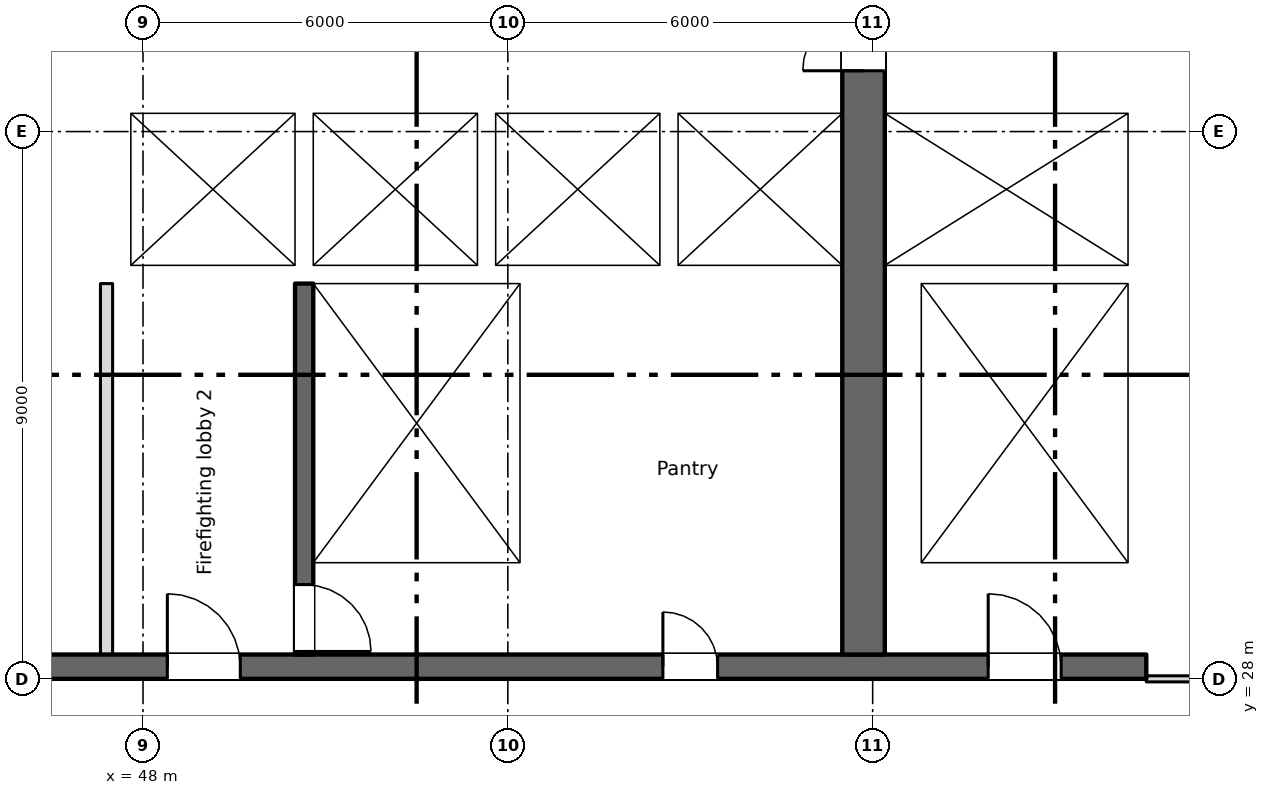
"""IFC4 building model, lengths in metres.
Left out: names, types, materials, properties, quantities, classifications, styles, units other than length and angle.
Written with IfcOpenShell. Run it as: python <this file> out.ifc"""

import sys

from ifc_helpers import new_model, si_unit, direction, frame, frame_2d, origin, place, context, subcontext, project, spatial, rectangle, extrude, element, fill, save


model = new_model("IFC4")
c1 = context("Model", 3, precision=1e-05, world=origin(), true_north=direction((0.0, 1.0)))
c2 = subcontext(c1, "Body", "Model", "MODEL_VIEW")
j1 = project(units=[si_unit("LENGTHUNIT", "METRE"), si_unit("PLANEANGLEUNIT", "RADIAN")], contexts=[c1])
p1 = place(None, origin())
s1 = spatial("IfcSite", under=j1, at=p1, CompositionType="ELEMENT")
p2 = place(p1, origin())
s2 = spatial("IfcBuilding", under=s1, at=p2, CompositionType="ELEMENT")
p3 = place(p2, frame((0.0, 0.0, 211.75)))
s3 = spatial("IfcBuildingStorey", under=s2, at=p3, CompositionType="ELEMENT", Elevation=211.75)
p4 = place(p3, frame((6.6, 28.2, 0.0), z_axis=(0.0, 0.0, 1.0), x_axis=(1.0, 0.0, 0.0)))
e1 = element("IfcWall", 1, at=p4, inside=s3, PredefinedType="SHEAR", context=c2, shape_type="SweptSolid", body=[
    extrude(rectangle(XDim=57.9, YDim=0.4, at=frame_2d((28.95, 0.0))), origin(), (0.0, 0.0, 1.0), 3.35),
])
p5 = place(p4, frame((12.663, 0.0, 0.0)))
e2 = element("IfcOpeningElement", 2, at=p5, cuts=e1, PredefinedType="OPENING", context=c2, shape_type="SweptSolid", body=[
    extrude(rectangle(XDim=0.9, YDim=2.1, at=frame_2d((0.45, 1.05))), frame((0.0, 0.21, 0.0), z_axis=(0.0, -1.0, 0.0), x_axis=(1.0, 0.0, 0.0)), (0.0, 0.0, 1.0), 0.42),
])
p6 = place(p4, frame((15.238, 0.0, 0.0)))
e3 = element("IfcOpeningElement", 3, at=p6, cuts=e1, PredefinedType="OPENING", context=c2, shape_type="SweptSolid", body=[
    extrude(rectangle(XDim=0.9, YDim=2.1, at=frame_2d((0.45, 1.05))), frame((0.0, 0.21, 0.0), z_axis=(0.0, -1.0, 0.0), x_axis=(1.0, 0.0, 0.0)), (0.0, 0.0, 1.0), 0.42),
])
p7 = place(p4, frame((49.95, 0.0, 0.0)))
e4 = element("IfcOpeningElement", 4, at=p7, cuts=e1, PredefinedType="OPENING", context=c2, shape_type="SweptSolid", body=[
    extrude(rectangle(XDim=0.9, YDim=2.1, at=frame_2d((0.45, 1.05))), frame((0.0, 0.21, 0.0), z_axis=(0.0, -1.0, 0.0), x_axis=(1.0, 0.0, 0.0)), (0.0, 0.0, 1.0), 0.42),
])
p8 = place(p4, frame((0.663, 0.0, 0.0)))
e5 = element("IfcOpeningElement", 5, at=p8, cuts=e1, PredefinedType="OPENING", context=c2, shape_type="SweptSolid", body=[
    extrude(rectangle(XDim=0.9, YDim=2.1, at=frame_2d((0.45, 1.05))), frame((0.0, 0.21, 0.0), z_axis=(0.0, -1.0, 0.0), x_axis=(1.0, 0.0, 0.0)), (0.0, 0.0, 1.0), 0.42),
])
p9 = place(p4, frame((2.238, 0.0, 0.0)))
e6 = element("IfcOpeningElement", 6, at=p9, cuts=e1, PredefinedType="OPENING", context=c2, shape_type="SweptSolid", body=[
    extrude(rectangle(XDim=0.9, YDim=2.1, at=frame_2d((0.45, 1.05))), frame((0.0, 0.21, 0.0), z_axis=(0.0, -1.0, 0.0), x_axis=(1.0, 0.0, 0.0)), (0.0, 0.0, 1.0), 0.42),
])
p10 = place(p4, frame((4.8, 0.0, 0.0)))
e7 = element("IfcOpeningElement", 7, at=p10, cuts=e1, PredefinedType="OPENING", context=c2, shape_type="SweptSolid", body=[
    extrude(rectangle(XDim=1.2, YDim=2.1, at=frame_2d((0.6, 1.05))), frame((0.0, 0.21, 0.0), z_axis=(0.0, -1.0, 0.0), x_axis=(1.0, 0.0, 0.0)), (0.0, 0.0, 1.0), 0.42),
])
p11 = place(p4, frame((31.8, 0.0, 0.0)))
e8 = element("IfcOpeningElement", 8, at=p11, cuts=e1, PredefinedType="OPENING", context=c2, shape_type="SweptSolid", body=[
    extrude(rectangle(XDim=1.2, YDim=2.1, at=frame_2d((0.6, 1.05))), frame((0.0, 0.21, 0.0), z_axis=(0.0, -1.0, 0.0), x_axis=(1.0, 0.0, 0.0)), (0.0, 0.0, 1.0), 0.42),
])
p12 = place(p4, frame((55.3, 0.0, 0.0)))
e9 = element("IfcOpeningElement", 9, at=p12, cuts=e1, PredefinedType="OPENING", context=c2, shape_type="SweptSolid", body=[
    extrude(rectangle(XDim=1.2, YDim=2.1, at=frame_2d((0.6, 1.05))), frame((0.0, 0.21, 0.0), z_axis=(0.0, -1.0, 0.0), x_axis=(1.0, 0.0, 0.0)), (0.0, 0.0, 1.0), 0.42),
])
p13 = place(p4, frame((21.8, 0.0, 0.0)))
e10 = element("IfcOpeningElement", 10, at=p13, cuts=e1, PredefinedType="OPENING", context=c2, shape_type="SweptSolid", body=[
    extrude(rectangle(XDim=1.2, YDim=2.1, at=frame_2d((0.6, 1.05))), frame((0.0, 0.21, 0.0), z_axis=(0.0, -1.0, 0.0), x_axis=(1.0, 0.0, 0.0)), (0.0, 0.0, 1.0), 0.42),
])
p14 = place(p4, frame((41.8, 0.0, 0.0)))
e11 = element("IfcOpeningElement", 11, at=p14, cuts=e1, PredefinedType="OPENING", context=c2, shape_type="SweptSolid", body=[
    extrude(rectangle(XDim=1.2, YDim=2.1, at=frame_2d((0.6, 1.05))), frame((0.0, 0.21, 0.0), z_axis=(0.0, -1.0, 0.0), x_axis=(1.0, 0.0, 0.0)), (0.0, 0.0, 1.0), 0.42),
])
p15 = place(p4, frame((24.95, 0.0, 0.0)))
e12 = element("IfcOpeningElement", 12, at=p15, cuts=e1, PredefinedType="OPENING", context=c2, shape_type="SweptSolid", body=[
    extrude(rectangle(XDim=2.4, YDim=2.1, at=frame_2d((1.2, 1.05))), frame((0.0, 0.21, 0.0), z_axis=(0.0, -1.0, 0.0), x_axis=(1.0, 0.0, 0.0)), (0.0, 0.0, 1.0), 0.42),
])
p16 = place(p4, frame((37.45, 0.0, 0.0)))
e13 = element("IfcOpeningElement", 13, at=p16, cuts=e1, PredefinedType="OPENING", context=c2, shape_type="SweptSolid", body=[
    extrude(rectangle(XDim=2.4, YDim=2.1, at=frame_2d((1.2, 1.05))), frame((0.0, 0.21, 0.0), z_axis=(0.0, -1.0, 0.0), x_axis=(1.0, 0.0, 0.0)), (0.0, 0.0, 1.0), 0.42),
])
p17 = place(p4, frame((8.1, 0.0, 0.0)))
e14 = element("IfcOpeningElement", 14, at=p17, cuts=e1, PredefinedType="OPENING", context=c2, shape_type="SweptSolid", body=[
    extrude(rectangle(XDim=2.4, YDim=2.1, at=frame_2d((1.2, 1.05))), frame((0.0, 0.21, 0.0), z_axis=(0.0, -1.0, 0.0), x_axis=(1.0, 0.0, 0.0)), (0.0, 0.0, 1.0), 0.42),
])
p18 = place(p4, frame((28.95, 0.0, 0.0)))
e15 = element("IfcOpeningElement", 15, at=p18, cuts=e1, PredefinedType="OPENING", context=c2, shape_type="SweptSolid", body=[
    extrude(rectangle(XDim=0.9, YDim=2.1, at=frame_2d((0.45, 1.05))), frame((0.0, 0.21, 0.0), z_axis=(0.0, -1.0, 0.0), x_axis=(1.0, 0.0, 0.0)), (0.0, 0.0, 1.0), 0.42),
])
p19 = place(p4, frame((34.95, 0.0, 0.0)))
e16 = element("IfcOpeningElement", 16, at=p19, cuts=e1, PredefinedType="OPENING", context=c2, shape_type="SweptSolid", body=[
    extrude(rectangle(XDim=0.9, YDim=2.1, at=frame_2d((0.45, 1.05))), frame((0.0, 0.21, 0.0), z_axis=(0.0, -1.0, 0.0), x_axis=(1.0, 0.0, 0.0)), (0.0, 0.0, 1.0), 0.42),
])
p20 = place(p3, frame((64.35, 34.8, 0.0), z_axis=(0.0, 0.0, 1.0), x_axis=(0.0, 1.0, 0.0)))
e17 = element("IfcWall", 17, at=p20, inside=s3, PredefinedType="SHEAR", context=c2, shape_type="SweptSolid", body=[
    extrude(rectangle(XDim=10.5, YDim=0.3, at=frame_2d((5.25, 0.0))), origin(), (0.0, 0.0, 1.0), 3.35),
])
p21 = place(p3, frame((59.85, 28.4, 0.0), z_axis=(0.0, 0.0, 1.0), x_axis=(0.0, 1.0, 0.0)))
e18 = element("IfcWall", 18, at=p21, inside=s3, PredefinedType="SHEAR", context=c2, shape_type="SweptSolid", body=[
    extrude(rectangle(XDim=16.9, YDim=0.7, at=frame_2d((8.45, 0.0))), origin(), (0.0, 0.0, 1.0), 3.35),
])
p22 = place(p21, frame((9.6, 0.0, 0.0)))
e19 = element("IfcOpeningElement", 19, at=p22, cuts=e18, PredefinedType="OPENING", context=c2, shape_type="SweptSolid", body=[
    extrude(rectangle(XDim=2.0, YDim=2.1, at=frame_2d((1.0, 1.05))), frame((0.0, 0.36, 0.0), z_axis=(0.0, -1.0, 0.0), x_axis=(1.0, 0.0, 0.0)), (0.0, 0.0, 1.0), 0.72),
])
p23 = place(p21, frame((15.4, 0.0, 0.0)))
e20 = element("IfcOpeningElement", 20, at=p23, cuts=e18, PredefinedType="OPENING", context=c2, shape_type="SweptSolid", body=[
    extrude(rectangle(XDim=1.2, YDim=2.1, at=frame_2d((0.6, 1.05))), frame((0.0, 0.36, 0.0), z_axis=(0.0, -1.0, 0.0), x_axis=(1.0, 0.0, 0.0)), (0.0, 0.0, 1.0), 0.72),
])
p24 = place(p3, frame((50.65, 34.5, 0.0), z_axis=(0.0, 0.0, 1.0), x_axis=(0.0, -1.0, 0.0)))
e21 = element("IfcWall", 21, at=p24, inside=s3, PredefinedType="SHEAR", context=c2, shape_type="SweptSolid", body=[
    extrude(rectangle(XDim=6.1, YDim=0.3, at=frame_2d((3.05, 0.0))), origin(), (0.0, 0.0, 1.0), 3.35),
])
p25 = place(p24, frame((4.95, 0.0, 0.0)))
e22 = element("IfcOpeningElement", 22, at=p25, cuts=e21, PredefinedType="OPENING", context=c2, shape_type="SweptSolid", body=[
    extrude(rectangle(XDim=1.1, YDim=2.1, at=frame_2d((0.55, 1.05))), frame((0.0, 0.16, 0.0), z_axis=(0.0, -1.0, 0.0), x_axis=(1.0, 0.0, 0.0)), (0.0, 0.0, 1.0), 0.32),
])
p26 = place(p3, frame((54.35, 28.4, 0.0), z_axis=(0.0, 0.0, 1.0), x_axis=(0.0, 1.0, 0.0)))
e23 = element("IfcWall", 23, at=p26, inside=s3, PredefinedType="SHEAR", context=c2, shape_type="SweptSolid", body=[
    extrude(rectangle(XDim=6.1, YDim=0.3, at=frame_2d((3.05, 0.0))), origin(), (0.0, 0.0, 1.0), 3.35),
])
p27 = place(p3, frame((60.5, 28.4, 0.0), z_axis=(0.0, 0.0, 1.0), x_axis=(0.0, 1.0, 0.0)))
e24 = element("IfcWall", 24, at=p27, inside=s3, PredefinedType="SHEAR", context=c2, shape_type="SweptSolid", body=[
    extrude(rectangle(XDim=6.1, YDim=0.6, at=frame_2d((3.05, 0.0))), origin(), (0.0, 0.0, 1.0), 3.35),
])
p28 = place(p3, frame((64.35, 28.4, 0.0), z_axis=(0.0, 0.0, 1.0), x_axis=(0.0, 1.0, 0.0)))
e25 = element("IfcWall", 25, at=p28, inside=s3, PredefinedType="SHEAR", context=c2, shape_type="SweptSolid", body=[
    extrude(rectangle(XDim=6.1, YDim=0.3, at=frame_2d((3.05, 0.0))), origin(), (0.0, 0.0, 1.0), 3.35),
])
p29 = place(p3, frame((47.3, 34.65, 0.0), z_axis=(0.0, 0.0, 1.0), x_axis=(1.0, 0.0, 0.0)))
e26 = element("IfcWall", 26, at=p29, inside=s3, PredefinedType="SHEAR", context=c2, shape_type="SweptSolid", body=[
    extrude(rectangle(XDim=12.2, YDim=0.3, at=frame_2d((6.1, 0.0))), origin(), (0.0, 0.0, 1.0), 3.35),
])
p30 = place(p29, frame((1.3, 0.0, 0.0)))
e27 = element("IfcOpeningElement", 27, at=p30, cuts=e26, PredefinedType="OPENING", context=c2, shape_type="SweptSolid", body=[
    extrude(rectangle(XDim=1.1, YDim=2.1, at=frame_2d((0.55, 1.05))), frame((0.0, 0.16, 0.0), z_axis=(0.0, -1.0, 0.0), x_axis=(1.0, 0.0, 0.0)), (0.0, 0.0, 1.0), 0.32),
])
p31 = place(p3, frame((60.2, 34.65, 0.0), z_axis=(0.0, 0.0, 1.0), x_axis=(1.0, 0.0, 0.0)))
e28 = element("IfcWall", 28, at=p31, inside=s3, PredefinedType="SHEAR", context=c2, shape_type="SweptSolid", body=[
    extrude(rectangle(XDim=4.3, YDim=0.3, at=frame_2d((2.15, 0.0))), origin(), (0.0, 0.0, 1.0), 3.35),
])
p32 = place(p3, frame((47.3, 37.45, 0.0), z_axis=(0.0, 0.0, 1.0), x_axis=(1.0, 0.0, 0.0)))
e29 = element("IfcWall", 29, at=p32, inside=s3, PredefinedType="SHEAR", context=c2, shape_type="SweptSolid", body=[
    extrude(rectangle(XDim=12.2, YDim=0.3, at=frame_2d((6.1, 0.0))), origin(), (0.0, 0.0, 1.0), 3.35),
])
p33 = place(p32, frame((4.3, 0.0, 0.0)))
e30 = element("IfcOpeningElement", 30, at=p33, cuts=e29, PredefinedType="OPENING", context=c2, shape_type="SweptSolid", body=[
    extrude(rectangle(XDim=1.1, YDim=2.1, at=frame_2d((0.55, 1.05))), frame((0.0, 0.16, 0.0), z_axis=(0.0, -1.0, 0.0), x_axis=(1.0, 0.0, 0.0)), (0.0, 0.0, 1.0), 0.32),
])
p34 = place(p32, frame((7.3, 0.0, 0.0)))
e31 = element("IfcOpeningElement", 31, at=p34, cuts=e29, PredefinedType="OPENING", context=c2, shape_type="SweptSolid", body=[
    extrude(rectangle(XDim=1.1, YDim=2.1, at=frame_2d((0.55, 1.05))), frame((0.0, 0.16, 0.0), z_axis=(0.0, -1.0, 0.0), x_axis=(1.0, 0.0, 0.0)), (0.0, 0.0, 1.0), 0.32),
])
p35 = place(p32, frame((10.3, 0.0, 0.0)))
e32 = element("IfcOpeningElement", 32, at=p35, cuts=e29, PredefinedType="OPENING", context=c2, shape_type="SweptSolid", body=[
    extrude(rectangle(XDim=1.1, YDim=2.1, at=frame_2d((0.55, 1.05))), frame((0.0, 0.16, 0.0), z_axis=(0.0, -1.0, 0.0), x_axis=(1.0, 0.0, 0.0)), (0.0, 0.0, 1.0), 0.32),
])
p36 = place(p3, frame((60.2, 37.45, 0.0), z_axis=(0.0, 0.0, 1.0), x_axis=(1.0, 0.0, 0.0)))
e33 = element("IfcWall", 33, at=p36, inside=s3, PredefinedType="SHEAR", context=c2, shape_type="SweptSolid", body=[
    extrude(rectangle(XDim=4.0, YDim=0.3, at=frame_2d((2.0, 0.0))), origin(), (0.0, 0.0, 1.0), 3.35),
])
p37 = place(p36, frame((1.45, 0.0, 0.0)))
e34 = element("IfcOpeningElement", 34, at=p37, cuts=e33, PredefinedType="OPENING", context=c2, shape_type="SweptSolid", body=[
    extrude(rectangle(XDim=1.1, YDim=2.1, at=frame_2d((0.55, 1.05))), frame((0.0, 0.16, 0.0), z_axis=(0.0, -1.0, 0.0), x_axis=(1.0, 0.0, 0.0)), (0.0, 0.0, 1.0), 0.32),
])
p38 = place(p3, frame((47.55, 34.8, 0.0), z_axis=(0.0, 0.0, 1.0), x_axis=(0.0, 1.0, 0.0)))
e35 = element("IfcWall", 35, at=p38, inside=s3, PredefinedType="SHEAR", context=c2, shape_type="SweptSolid", body=[
    extrude(rectangle(XDim=2.5, YDim=0.5, at=frame_2d((1.25, 0.0))), origin(), (0.0, 0.0, 1.0), 3.35),
])
for number, where, z_axis, x_axis in (
    (36, (50.65, 34.8, 0.0), (0.0, 0.0, 1.0), (0.0, 1.0, 0.0)),
    (37, (53.65, 34.8, 0.0), (0.0, 0.0, 1.0), (0.0, 1.0, 0.0)),
    (38, (56.65, 34.8, 0.0), (0.0, 0.0, 1.0), (0.0, 1.0, 0.0)),
):
    element("IfcWall", number, at=place(p3, frame(where, z_axis=z_axis, x_axis=x_axis)), inside=s3, PredefinedType="SHEAR", context=c2, shape_type="SweptSolid", body=[
        extrude(rectangle(XDim=2.5, YDim=0.3, at=frame_2d((1.25, 0.0))), origin(), (0.0, 0.0, 1.0), 3.35),
    ])
p39 = place(p3, frame((47.4, 28.4, 0.0), z_axis=(0.0, 0.0, 1.0), x_axis=(0.0, 1.0, 0.0)))
e39 = element("IfcWall", 39, at=p39, inside=s3, PredefinedType="PARTITIONING", context=c2, shape_type="SweptSolid", body=[
    extrude(rectangle(XDim=6.1, YDim=0.2, at=frame_2d((3.05, 0.0))), origin(), (0.0, 0.0, 1.0), 3.35),
])
p40 = place(p3, frame((64.5, 28.0, 0.0), z_axis=(0.0, 0.0, 1.0), x_axis=(1.0, 0.0, 0.0)))
e40 = element("IfcWall", 40, at=p40, inside=s3, PredefinedType="PARTITIONING", context=c2, shape_type="SweptSolid", body=[
    extrude(rectangle(XDim=6.9, YDim=0.1, at=frame_2d((3.45, 0.0))), origin(), (0.0, 0.0, 1.0), 3.35),
])
p41 = place(p40, frame((2.55, 0.0, 0.0)))
e41 = element("IfcOpeningElement", 41, at=p41, cuts=e40, PredefinedType="OPENING", context=c2, shape_type="SweptSolid", body=[
    extrude(rectangle(XDim=1.8, YDim=2.1, at=frame_2d((0.9, 1.05))), frame((0.0, 0.06, 0.0), z_axis=(0.0, -1.0, 0.0), x_axis=(1.0, 0.0, 0.0)), (0.0, 0.0, 1.0), 0.12),
])
p42 = place(p7, origin())
e42 = element("IfcDoor", 42, at=p42, inside=s3, OperationType="SINGLE_SWING_LEFT", PredefinedType="DOOR", context=c2, shape_type="SweptSolid", body=[
    extrude(rectangle(XDim=0.9, YDim=2.1, at=frame_2d((0.45, 1.05))), frame((0.0, 0.025, 0.0), z_axis=(0.0, -1.0, 0.0), x_axis=(1.0, 0.0, 0.0)), (0.0, 0.0, 1.0), 0.05),
])
fill(e4, e42)
p43 = place(p33, origin())
e43 = element("IfcDoor", 43, at=p43, inside=s3, OperationType="SLIDING_TO_LEFT", PredefinedType="DOOR", context=c2, shape_type="SweptSolid", body=[
    extrude(rectangle(XDim=1.1, YDim=2.1, at=frame_2d((0.55, 1.05))), frame((0.0, 0.025, 0.0), z_axis=(0.0, -1.0, 0.0), x_axis=(1.0, 0.0, 0.0)), (0.0, 0.0, 1.0), 0.05),
])
fill(e30, e43)
p44 = place(p34, origin())
e44 = element("IfcDoor", 44, at=p44, inside=s3, OperationType="SLIDING_TO_LEFT", PredefinedType="DOOR", context=c2, shape_type="SweptSolid", body=[
    extrude(rectangle(XDim=1.1, YDim=2.1, at=frame_2d((0.55, 1.05))), frame((0.0, 0.025, 0.0), z_axis=(0.0, -1.0, 0.0), x_axis=(1.0, 0.0, 0.0)), (0.0, 0.0, 1.0), 0.05),
])
fill(e31, e44)
p45 = place(p35, origin())
e45 = element("IfcDoor", 45, at=p45, inside=s3, OperationType="SLIDING_TO_LEFT", PredefinedType="DOOR", context=c2, shape_type="SweptSolid", body=[
    extrude(rectangle(XDim=1.1, YDim=2.1, at=frame_2d((0.55, 1.05))), frame((0.0, 0.025, 0.0), z_axis=(0.0, -1.0, 0.0), x_axis=(1.0, 0.0, 0.0)), (0.0, 0.0, 1.0), 0.05),
])
fill(e32, e45)
p46 = place(p37, origin())
e46 = element("IfcDoor", 46, at=p46, inside=s3, OperationType="SLIDING_TO_LEFT", PredefinedType="DOOR", context=c2, shape_type="SweptSolid", body=[
    extrude(rectangle(XDim=1.1, YDim=2.1, at=frame_2d((0.55, 1.05))), frame((0.0, 0.025, 0.0), z_axis=(0.0, -1.0, 0.0), x_axis=(1.0, 0.0, 0.0)), (0.0, 0.0, 1.0), 0.05),
])
fill(e34, e46)
p47 = place(p30, origin())
e47 = element("IfcDoor", 47, at=p47, inside=s3, OperationType="SLIDING_TO_LEFT", PredefinedType="DOOR", context=c2, shape_type="SweptSolid", body=[
    extrude(rectangle(XDim=1.1, YDim=2.1, at=frame_2d((0.55, 1.05))), frame((0.0, 0.025, 0.0), z_axis=(0.0, -1.0, 0.0), x_axis=(1.0, 0.0, 0.0)), (0.0, 0.0, 1.0), 0.05),
])
fill(e27, e47)
p48 = place(p25, origin())
e48 = element("IfcDoor", 48, at=p48, inside=s3, OperationType="SINGLE_SWING_RIGHT", PredefinedType="DOOR", context=c2, shape_type="SweptSolid", body=[
    extrude(rectangle(XDim=1.1, YDim=2.1, at=frame_2d((0.55, 1.05))), frame((0.0, 0.025, 0.0), z_axis=(0.0, -1.0, 0.0), x_axis=(1.0, 0.0, 0.0)), (0.0, 0.0, 1.0), 0.05),
])
fill(e22, e48)
p49 = place(p12, origin())
e49 = element("IfcDoor", 49, at=p49, inside=s3, OperationType="SINGLE_SWING_LEFT", PredefinedType="DOOR", context=c2, shape_type="SweptSolid", body=[
    extrude(rectangle(XDim=1.2, YDim=2.1, at=frame_2d((0.6, 1.05))), frame((0.0, 0.025, 0.0), z_axis=(0.0, -1.0, 0.0), x_axis=(1.0, 0.0, 0.0)), (0.0, 0.0, 1.0), 0.05),
])
fill(e9, e49)
p50 = place(p14, origin())
e50 = element("IfcDoor", 50, at=p50, inside=s3, OperationType="SINGLE_SWING_LEFT", PredefinedType="DOOR", context=c2, shape_type="SweptSolid", body=[
    extrude(rectangle(XDim=1.2, YDim=2.1, at=frame_2d((0.6, 1.05))), frame((0.0, 0.025, 0.0), z_axis=(0.0, -1.0, 0.0), x_axis=(1.0, 0.0, 0.0)), (0.0, 0.0, 1.0), 0.05),
])
fill(e11, e50)
p51 = place(p22, origin())
e51 = element("IfcDoor", 51, at=p51, inside=s3, OperationType="DOUBLE_DOOR_SINGLE_SWING", PredefinedType="DOOR", context=c2, shape_type="SweptSolid", body=[
    extrude(rectangle(XDim=2.0, YDim=2.1, at=frame_2d((1.0, 1.05))), frame((0.0, 0.025, 0.0), z_axis=(0.0, -1.0, 0.0), x_axis=(1.0, 0.0, 0.0)), (0.0, 0.0, 1.0), 0.05),
])
fill(e19, e51)
save(model, sys.argv[1])
